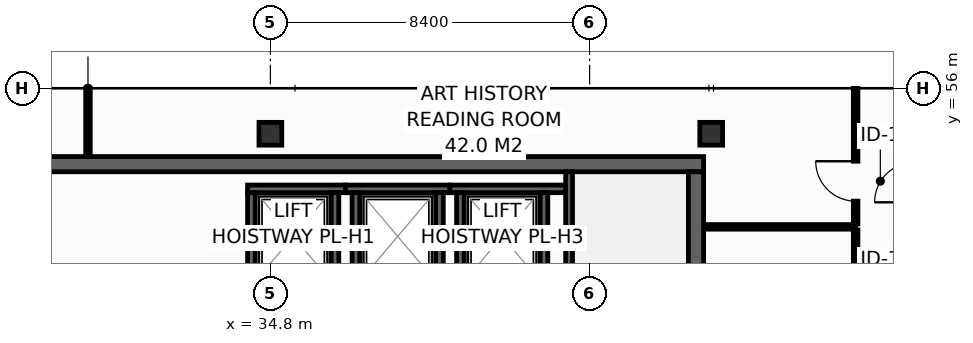
"""IFC4 building model, lengths in metres.
Left out: names, types, materials, properties, quantities, classifications, styles, units other than length and angle.
Written with IfcOpenShell. Run it as: python <this file> out.ifc"""

import sys

from ifc_helpers import new_model, si_unit, direction, frame, frame_2d, origin, origin_2d, place, context, subcontext, project, spatial, rectangle, hollow_rectangle, extrude, element, fill, save


model = new_model("IFC4")
c1 = context("Model", 3, precision=1e-05, world=origin(), true_north=direction((0.0, 1.0)))
c2 = subcontext(c1, "Body", "Model", "MODEL_VIEW")
j1 = project(units=[si_unit("LENGTHUNIT", "METRE"), si_unit("PLANEANGLEUNIT", "RADIAN")], contexts=[c1])
p1 = place(None, origin())
s1 = spatial("IfcSite", under=j1, at=p1, CompositionType="ELEMENT")
p2 = place(p1, origin())
s2 = spatial("IfcBuilding", under=s1, at=p2, CompositionType="ELEMENT")
p3 = place(p2, frame((0.0, 0.0, 283.8)))
s3 = spatial("IfcBuildingStorey", under=s2, at=p3, CompositionType="ELEMENT", Elevation=283.8)
p4 = place(p3, frame((13.7, 54.0, 0.0), z_axis=(0.0, 0.0, 1.0), x_axis=(1.0, 0.0, 0.0)))
e1 = element("IfcWall", 1, at=p4, inside=s3, PredefinedType="SHEAR", context=c2, shape_type="SweptSolid", body=[
    extrude(rectangle(XDim=32.5, YDim=0.4, at=frame_2d((16.25, 0.0))), origin(), (0.0, 0.0, 1.0), 3.55),
])
p5 = place(p3, frame((46.0, 43.4, 0.0), z_axis=(0.0, 0.0, 1.0), x_axis=(0.0, 1.0, 0.0)))
e2 = element("IfcWall", 2, at=p5, inside=s3, PredefinedType="SHEAR", context=c2, shape_type="SweptSolid", body=[
    extrude(rectangle(XDim=10.4, YDim=0.4, at=frame_2d((5.2, 0.0))), origin(), (0.0, 0.0, 1.0), 3.55),
])
for number, where, z_axis, x_axis in (
    (3, (34.8, 54.8, 0.0), (0.0, 0.0, 1.0), (1.0, 0.0, 0.0)),
    (4, (46.4, 54.8, 0.0), (0.0, 0.0, 1.0), (1.0, 0.0, 0.0)),
):
    element("IfcColumn", number, at=place(p3, frame(where, z_axis=z_axis, x_axis=x_axis)), inside=s3, PredefinedType="COLUMN", context=c2, shape_type="SweptSolid", body=[
        extrude(hollow_rectangle(XDim=0.6, YDim=0.6, WallThickness=0.028, at=origin_2d()), origin(), (0.0, 0.0, 1.0), 3.8),
    ])
p6 = place(p3, frame((34.2, 53.35, 0.0), z_axis=(0.0, 0.0, 1.0), x_axis=(1.0, 0.0, 0.0)))
e5 = element("IfcWall", 5, at=p6, inside=s3, PredefinedType="SHEAR", context=c2, shape_type="SweptSolid", body=[
    extrude(rectangle(XDim=2.575, YDim=0.2, at=frame_2d((1.288, 0.0))), origin(), (0.0, 0.0, 1.0), 3.55),
])
for number, where, z_axis, x_axis in (
    (6, (34.3, 50.95, 0.0), (0.0, 0.0, 1.0), (0.0, 1.0, 0.0)),
    (7, (36.5, 50.95, 0.0), (0.0, 0.0, 1.0), (0.0, 1.0, 0.0)),
):
    element("IfcWall", number, at=place(p3, frame(where, z_axis=z_axis, x_axis=x_axis)), inside=s3, PredefinedType="SHEAR", context=c2, shape_type="SweptSolid", body=[
        extrude(rectangle(XDim=2.3, YDim=0.2, at=frame_2d((1.15, 0.0))), origin(), (0.0, 0.0, 1.0), 3.55),
    ])
p7 = place(p3, frame((36.775, 53.35, 0.0), z_axis=(0.0, 0.0, 1.0), x_axis=(1.0, 0.0, 0.0)))
e8 = element("IfcWall", 8, at=p7, inside=s3, PredefinedType="SHEAR", context=c2, shape_type="SweptSolid", body=[
    extrude(rectangle(XDim=2.75, YDim=0.2, at=frame_2d((1.375, 0.0))), origin(), (0.0, 0.0, 1.0), 3.55),
])
for number, where, z_axis, x_axis in (
    (9, (37.05, 50.95, 0.0), (0.0, 0.0, 1.0), (0.0, 1.0, 0.0)),
    (10, (39.25, 50.95, 0.0), (0.0, 0.0, 1.0), (0.0, 1.0, 0.0)),
):
    element("IfcWall", number, at=place(p3, frame(where, z_axis=z_axis, x_axis=x_axis)), inside=s3, PredefinedType="SHEAR", context=c2, shape_type="SweptSolid", body=[
        extrude(rectangle(XDim=2.3, YDim=0.2, at=frame_2d((1.15, 0.0))), origin(), (0.0, 0.0, 1.0), 3.55),
    ])
p8 = place(p3, frame((39.525, 53.35, 0.0), z_axis=(0.0, 0.0, 1.0), x_axis=(1.0, 0.0, 0.0)))
e11 = element("IfcWall", 11, at=p8, inside=s3, PredefinedType="SHEAR", context=c2, shape_type="SweptSolid", body=[
    extrude(rectangle(XDim=3.045, YDim=0.2, at=frame_2d((1.522, 0.0))), origin(), (0.0, 0.0, 1.0), 3.55),
])
for number, where, z_axis, x_axis in (
    (12, (39.8, 50.95, 0.0), (0.0, 0.0, 1.0), (0.0, 1.0, 0.0)),
    (13, (42.0, 50.95, 0.0), (0.0, 0.0, 1.0), (0.0, 1.0, 0.0)),
):
    element("IfcWall", number, at=place(p3, frame(where, z_axis=z_axis, x_axis=x_axis)), inside=s3, PredefinedType="SHEAR", context=c2, shape_type="SweptSolid", body=[
        extrude(rectangle(XDim=2.3, YDim=0.2, at=frame_2d((1.15, 0.0))), origin(), (0.0, 0.0, 1.0), 3.55),
    ])
p9 = place(p3, frame((42.66, 53.8, 0.0), z_axis=(0.0, 0.0, 1.0), x_axis=(0.0, -1.0, 0.0)))
e14 = element("IfcWall", 14, at=p9, inside=s3, PredefinedType="SHEAR", context=c2, shape_type="SweptSolid", body=[
    extrude(rectangle(XDim=10.4, YDim=0.18, at=frame_2d((5.2, 0.0))), origin(), (0.0, 0.0, 1.0), 3.55),
])
p10 = place(p9, frame((8.99, 0.0, 0.0)))
e15 = element("IfcOpeningElement", 15, at=p10, cuts=e14, PredefinedType="OPENING", context=c2, shape_type="SweptSolid", body=[
    extrude(rectangle(XDim=1.1, YDim=2.15, at=frame_2d((0.55, 1.075))), frame((0.0, 0.1, 0.0), z_axis=(0.0, -1.0, 0.0), x_axis=(1.0, 0.0, 0.0)), (0.0, 0.0, 1.0), 0.2),
])
p11 = place(p3, frame((46.22, 52.35, 0.0), z_axis=(0.0, 0.0, 1.0), x_axis=(1.0, 0.0, 0.0)))
e16 = element("IfcWall", 16, at=p11, inside=s3, PredefinedType="PARTITIONING", context=c2, shape_type="SweptSolid", body=[
    extrude(rectangle(XDim=3.98, YDim=0.12, at=frame_2d((1.99, 0.0))), origin(), (0.0, 0.0, 1.0), 3.55),
])
p12 = place(p3, frame((30.0, 54.22, 0.0), z_axis=(0.0, 0.0, 1.0), x_axis=(0.0, 1.0, 0.0)))
e17 = element("IfcWall", 17, at=p12, inside=s3, PredefinedType="PARTITIONING", context=c2, shape_type="SweptSolid", body=[
    extrude(rectangle(XDim=1.775, YDim=0.12, at=frame_2d((0.888, 0.0))), origin(), (0.0, 0.0, 1.0), 2.935),
])
p13 = place(p3, frame((50.2, 48.29, 0.0), z_axis=(0.0, 0.0, 1.0), x_axis=(0.0, 1.0, 0.0)))
e18 = element("IfcWall", 18, at=p13, inside=s3, PredefinedType="PARTITIONING", context=c2, shape_type="SweptSolid", body=[
    extrude(rectangle(XDim=3.98, YDim=0.12, at=frame_2d((1.99, 0.0))), origin(), (0.0, 0.0, 1.0), 3.55),
])
p14 = place(p13, frame((1.465, 0.0, 0.0)))
e19 = element("IfcOpeningElement", 19, at=p14, cuts=e18, PredefinedType="OPENING", context=c2, shape_type="SweptSolid", body=[
    extrude(rectangle(XDim=1.05, YDim=2.15, at=frame_2d((0.525, 1.075))), frame((0.0, 0.07, 0.0), z_axis=(0.0, -1.0, 0.0), x_axis=(1.0, 0.0, 0.0)), (0.0, 0.0, 1.0), 0.14),
])
p15 = place(p3, frame((50.2, 52.43, 0.0), z_axis=(0.0, 0.0, 1.0), x_axis=(0.0, 1.0, 0.0)))
e20 = element("IfcWall", 20, at=p15, inside=s3, PredefinedType="PARTITIONING", context=c2, shape_type="SweptSolid", body=[
    extrude(rectangle(XDim=3.565, YDim=0.12, at=frame_2d((1.783, 0.0))), origin(), (0.0, 0.0, 1.0), 2.935),
])
p16 = place(p15, frame((0.597, 0.0, 0.0)))
e21 = element("IfcOpeningElement", 21, at=p16, cuts=e20, PredefinedType="OPENING", context=c2, shape_type="SweptSolid", body=[
    extrude(rectangle(XDim=1.05, YDim=2.15, at=frame_2d((0.525, 1.075))), frame((0.0, 0.07, 0.0), z_axis=(0.0, -1.0, 0.0), x_axis=(1.0, 0.0, 0.0)), (0.0, 0.0, 1.0), 0.14),
])
p17 = place(p16, origin())
e22 = element("IfcDoor", 22, at=p17, inside=s3, OperationType="SINGLE_SWING_RIGHT", PredefinedType="DOOR", context=c2, shape_type="SweptSolid", body=[
    extrude(rectangle(XDim=1.05, YDim=2.15, at=frame_2d((0.525, 1.075))), frame((0.0, 0.025, 0.0), z_axis=(0.0, -1.0, 0.0), x_axis=(1.0, 0.0, 0.0)), (0.0, 0.0, 1.0), 0.05),
])
fill(e21, e22)
save(model, sys.argv[1])
